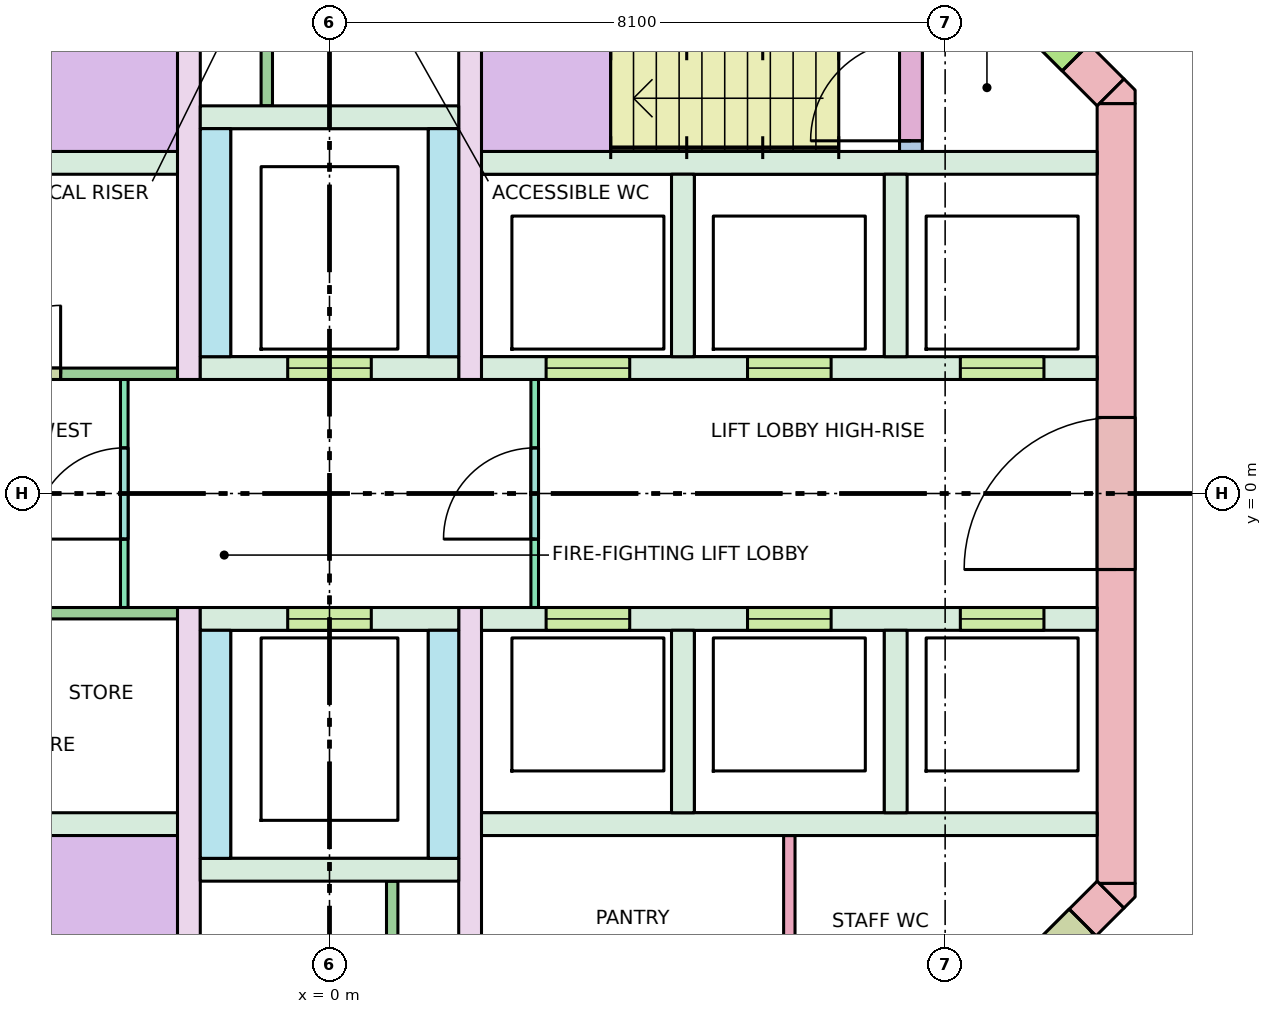
"""IFC4 building model, lengths in metres.
Left out: names, types, materials, properties, quantities, classifications, styles, units other than length and angle.
Written with IfcOpenShell. Run it as: python <this file> out.ifc"""

import sys

from ifc_helpers import new_model, si_unit, direction, frame, frame_2d, origin, place, context, subcontext, project, spatial, polyline, rectangle, outline, extrude, element, fill, save


model = new_model("IFC4")
c1 = context("Model", 3, precision=1e-05, world=origin(), true_north=direction((0.0, 1.0)))
c2 = subcontext(c1, "Body", "Model", "MODEL_VIEW")
j1 = project(units=[si_unit("LENGTHUNIT", "METRE"), si_unit("PLANEANGLEUNIT", "RADIAN")], contexts=[c1])
p1 = place(None, origin())
s1 = spatial("IfcSite", under=j1, at=p1, CompositionType="ELEMENT")
p2 = place(p1, origin())
s2 = spatial("IfcBuilding", under=s1, at=p2, CompositionType="ELEMENT")
p3 = place(p2, frame((0.0, 0.0, 283.4)))
s3 = spatial("IfcBuildingStorey", under=s2, at=p3, CompositionType="ELEMENT", Elevation=283.4)
p4 = place(p3, frame((10.35, -5.13, -0.28), z_axis=(0.0, 0.0, 1.0), x_axis=(0.0, 1.0, 0.0)))
e1 = element("IfcWall", 1, at=p4, inside=s3, PredefinedType="SHEAR", context=c2, shape_type="SweptSolid", body=[
    extrude(rectangle(XDim=10.26, YDim=0.5, at=frame_2d((5.13, 0.0))), origin(), (0.0, 0.0, 1.0), 3.7),
])
p5 = place(p4, frame((4.13, 0.0, 0.28)))
e2 = element("IfcOpeningElement", 2, at=p5, cuts=e1, PredefinedType="OPENING", context=c2, shape_type="SweptSolid", body=[
    extrude(rectangle(XDim=2.0, YDim=2.1, at=frame_2d((1.0, 1.05))), frame((0.0, 0.26, 0.0), z_axis=(0.0, -1.0, 0.0), x_axis=(1.0, 0.0, 0.0)), (0.0, 0.0, 1.0), 0.52),
])
p6 = place(p3, frame((7.277, 8.277, -0.28), z_axis=(0.0, 0.0, 1.0), x_axis=(0.707106781187, -0.707106781187, 0.0)))
e3 = element("IfcWall", 3, at=p6, inside=s3, PredefinedType="SHEAR", context=c2, shape_type="SweptSolid", body=[
    extrude(rectangle(XDim=4.243, YDim=0.5, at=frame_2d((2.121, 0.0))), origin(), (0.0, 0.0, 1.0), 3.7),
])
p7 = place(p6, frame((2.393, 0.0, 0.28)))
e4 = element("IfcOpeningElement", 4, at=p7, cuts=e3, PredefinedType="OPENING", context=c2, shape_type="SweptSolid", body=[
    extrude(rectangle(XDim=1.2, YDim=2.1, at=frame_2d((0.6, 1.05))), frame((0.0, 0.26, 0.0), z_axis=(0.0, -1.0, 0.0), x_axis=(1.0, 0.0, 0.0)), (0.0, 0.0, 1.0), 0.52),
])
p8 = place(p3, frame((10.277, -5.277, -0.28), z_axis=(0.0, 0.0, 1.0), x_axis=(-0.707106781187, -0.707106781187, 0.0)))
e5 = element("IfcWall", 5, at=p8, inside=s3, PredefinedType="SHEAR", context=c2, shape_type="SweptSolid", body=[
    extrude(rectangle(XDim=4.243, YDim=0.5, at=frame_2d((2.121, 0.0))), origin(), (0.0, 0.0, 1.0), 3.7),
])
p9 = place(p8, frame((0.52, 0.0, 0.28)))
e6 = element("IfcOpeningElement", 6, at=p9, cuts=e5, PredefinedType="OPENING", context=c2, shape_type="SweptSolid", body=[
    extrude(rectangle(XDim=0.9, YDim=2.1, at=frame_2d((0.45, 1.05))), frame((0.0, 0.26, 0.0), z_axis=(0.0, -1.0, 0.0), x_axis=(1.0, 0.0, 0.0)), (0.0, 0.0, 1.0), 0.52),
])
p10 = place(p3, frame((0.0, 0.0, -0.28)))
e7 = element("IfcWall", 7, at=p10, inside=s3, PredefinedType="SHEAR", context=c2, shape_type="SweptSolid", body=[
    extrude(outline(polyline([(10.6, -5.307), (10.454, -5.454), (10.13, -5.13), (10.6, -5.13), (10.6, -5.307)])), origin(), (0.0, 0.0, 1.0), 3.7),
])
p11 = place(p3, frame((0.0, 0.0, -0.28)))
e8 = element("IfcWall", 8, at=p11, inside=s3, PredefinedType="SHEAR", context=c2, shape_type="SweptSolid", body=[
    extrude(outline(polyline([(10.6, 5.307), (10.6, 5.13), (10.13, 5.13), (10.454, 5.454), (10.6, 5.307)])), origin(), (0.0, 0.0, 1.0), 3.7),
])
for number, where, z_axis, x_axis in (
    (9, (-10.1, 4.35, 0.0), (0.0, 0.0, 1.0), (1.0, 0.0, 0.0)),
    (10, (-10.1, -4.35, 0.0), (0.0, 0.0, 1.0), (1.0, 0.0, 0.0)),
    (11, (2.0, 4.35, 0.0), (0.0, 0.0, 1.0), (1.0, 0.0, 0.0)),
    (12, (2.0, -4.35, 0.0), (0.0, 0.0, 1.0), (1.0, 0.0, 0.0)),
):
    element("IfcWall", number, at=place(p3, frame(where, z_axis=z_axis, x_axis=x_axis)), inside=s3, PredefinedType="SOLIDWALL", context=c2, shape_type="SweptSolid", body=[
        extrude(rectangle(XDim=8.1, YDim=0.3, at=frame_2d((4.05, 0.0))), origin(), (0.0, 0.0, 1.0), 3.42),
    ])
p12 = place(p3, frame((2.0, 1.65, 0.0), z_axis=(0.0, 0.0, 1.0), x_axis=(1.0, 0.0, 0.0)))
e13 = element("IfcWall", 13, at=p12, inside=s3, PredefinedType="SOLIDWALL", context=c2, shape_type="SweptSolid", body=[
    extrude(rectangle(XDim=8.1, YDim=0.3, at=frame_2d((4.05, 0.0))), origin(), (0.0, 0.0, 1.0), 3.42),
])
p13 = place(p12, frame((0.85, 0.0, 0.0)))
e14 = element("IfcOpeningElement", 14, at=p13, cuts=e13, PredefinedType="OPENING", context=c2, shape_type="SweptSolid", body=[
    extrude(rectangle(XDim=1.1, YDim=2.1, at=frame_2d((0.55, 1.05))), frame((0.0, 0.16, 0.0), z_axis=(0.0, -1.0, 0.0), x_axis=(1.0, 0.0, 0.0)), (0.0, 0.0, 1.0), 0.32),
])
p14 = place(p12, frame((3.5, 0.0, 0.0)))
e15 = element("IfcOpeningElement", 15, at=p14, cuts=e13, PredefinedType="OPENING", context=c2, shape_type="SweptSolid", body=[
    extrude(rectangle(XDim=1.1, YDim=2.1, at=frame_2d((0.55, 1.05))), frame((0.0, 0.16, 0.0), z_axis=(0.0, -1.0, 0.0), x_axis=(1.0, 0.0, 0.0)), (0.0, 0.0, 1.0), 0.32),
])
p15 = place(p12, frame((6.3, 0.0, 0.0)))
e16 = element("IfcOpeningElement", 16, at=p15, cuts=e13, PredefinedType="OPENING", context=c2, shape_type="SweptSolid", body=[
    extrude(rectangle(XDim=1.1, YDim=2.1, at=frame_2d((0.55, 1.05))), frame((0.0, 0.16, 0.0), z_axis=(0.0, -1.0, 0.0), x_axis=(1.0, 0.0, 0.0)), (0.0, 0.0, 1.0), 0.32),
])
p16 = place(p3, frame((2.0, -1.65, 0.0), z_axis=(0.0, 0.0, 1.0), x_axis=(1.0, 0.0, 0.0)))
e17 = element("IfcWall", 17, at=p16, inside=s3, PredefinedType="SOLIDWALL", context=c2, shape_type="SweptSolid", body=[
    extrude(rectangle(XDim=8.1, YDim=0.3, at=frame_2d((4.05, 0.0))), origin(), (0.0, 0.0, 1.0), 3.42),
])
p17 = place(p16, frame((0.85, 0.0, 0.0)))
e18 = element("IfcOpeningElement", 18, at=p17, cuts=e17, PredefinedType="OPENING", context=c2, shape_type="SweptSolid", body=[
    extrude(rectangle(XDim=1.1, YDim=2.1, at=frame_2d((0.55, 1.05))), frame((0.0, 0.16, 0.0), z_axis=(0.0, -1.0, 0.0), x_axis=(1.0, 0.0, 0.0)), (0.0, 0.0, 1.0), 0.32),
])
p18 = place(p16, frame((3.5, 0.0, 0.0)))
e19 = element("IfcOpeningElement", 19, at=p18, cuts=e17, PredefinedType="OPENING", context=c2, shape_type="SweptSolid", body=[
    extrude(rectangle(XDim=1.1, YDim=2.1, at=frame_2d((0.55, 1.05))), frame((0.0, 0.16, 0.0), z_axis=(0.0, -1.0, 0.0), x_axis=(1.0, 0.0, 0.0)), (0.0, 0.0, 1.0), 0.32),
])
p19 = place(p16, frame((6.3, 0.0, 0.0)))
e20 = element("IfcOpeningElement", 20, at=p19, cuts=e17, PredefinedType="OPENING", context=c2, shape_type="SweptSolid", body=[
    extrude(rectangle(XDim=1.1, YDim=2.1, at=frame_2d((0.55, 1.05))), frame((0.0, 0.16, 0.0), z_axis=(0.0, -1.0, 0.0), x_axis=(1.0, 0.0, 0.0)), (0.0, 0.0, 1.0), 0.32),
])
for number, where, z_axis, x_axis in (
    (21, (4.65, 1.8, 0.0), (0.0, 0.0, 1.0), (0.0, 1.0, 0.0)),
    (22, (4.65, -4.2, 0.0), (0.0, 0.0, 1.0), (0.0, 1.0, 0.0)),
    (23, (7.45, 1.8, 0.0), (0.0, 0.0, 1.0), (0.0, 1.0, 0.0)),
    (24, (7.45, -4.2, 0.0), (0.0, 0.0, 1.0), (0.0, 1.0, 0.0)),
):
    element("IfcWall", number, at=place(p3, frame(where, z_axis=z_axis, x_axis=x_axis)), inside=s3, PredefinedType="SOLIDWALL", context=c2, shape_type="SweptSolid", body=[
        extrude(rectangle(XDim=2.4, YDim=0.3, at=frame_2d((1.2, 0.0))), origin(), (0.0, 0.0, 1.0), 3.42),
    ])
for number, where, z_axis, x_axis in (
    (25, (-1.85, 1.5, 0.0), (0.0, 0.0, 1.0), (0.0, 1.0, 0.0)),
    (26, (-1.85, -8.1, 0.0), (0.0, 0.0, 1.0), (0.0, 1.0, 0.0)),
    (27, (1.85, 1.5, 0.0), (0.0, 0.0, 1.0), (0.0, 1.0, 0.0)),
    (28, (1.85, -8.1, 0.0), (0.0, 0.0, 1.0), (0.0, 1.0, 0.0)),
):
    element("IfcWall", number, at=place(p3, frame(where, z_axis=z_axis, x_axis=x_axis)), inside=s3, PredefinedType="SHEAR", context=c2, shape_type="SweptSolid", body=[
        extrude(rectangle(XDim=6.6, YDim=0.3, at=frame_2d((3.3, 0.0))), origin(), (0.0, 0.0, 1.0), 3.42),
    ])
p20 = place(p3, frame((-1.7, 1.65, 0.0), z_axis=(0.0, 0.0, 1.0), x_axis=(1.0, 0.0, 0.0)))
e29 = element("IfcWall", 29, at=p20, inside=s3, PredefinedType="SOLIDWALL", context=c2, shape_type="SweptSolid", body=[
    extrude(rectangle(XDim=3.4, YDim=0.3, at=frame_2d((1.7, 0.0))), origin(), (0.0, 0.0, 1.0), 3.42),
])
p21 = place(p20, frame((1.15, 0.0, 0.0)))
e30 = element("IfcOpeningElement", 30, at=p21, cuts=e29, PredefinedType="OPENING", context=c2, shape_type="SweptSolid", body=[
    extrude(rectangle(XDim=1.1, YDim=2.1, at=frame_2d((0.55, 1.05))), frame((0.0, 0.16, 0.0), z_axis=(0.0, -1.0, 0.0), x_axis=(1.0, 0.0, 0.0)), (0.0, 0.0, 1.0), 0.32),
])
p22 = place(p3, frame((-1.7, -1.65, 0.0), z_axis=(0.0, 0.0, 1.0), x_axis=(1.0, 0.0, 0.0)))
e31 = element("IfcWall", 31, at=p22, inside=s3, PredefinedType="SOLIDWALL", context=c2, shape_type="SweptSolid", body=[
    extrude(rectangle(XDim=3.4, YDim=0.3, at=frame_2d((1.7, 0.0))), origin(), (0.0, 0.0, 1.0), 3.42),
])
p23 = place(p22, frame((1.15, 0.0, 0.0)))
e32 = element("IfcOpeningElement", 32, at=p23, cuts=e31, PredefinedType="OPENING", context=c2, shape_type="SweptSolid", body=[
    extrude(rectangle(XDim=1.1, YDim=2.1, at=frame_2d((0.55, 1.05))), frame((0.0, 0.16, 0.0), z_axis=(0.0, -1.0, 0.0), x_axis=(1.0, 0.0, 0.0)), (0.0, 0.0, 1.0), 0.32),
])
for number, where, z_axis, x_axis in (
    (33, (-1.5, 1.8, 0.0), (0.0, 0.0, 1.0), (0.0, 1.0, 0.0)),
    (34, (-1.5, -4.8, 0.0), (0.0, 0.0, 1.0), (0.0, 1.0, 0.0)),
    (35, (1.5, 1.8, 0.0), (0.0, 0.0, 1.0), (0.0, 1.0, 0.0)),
    (36, (1.5, -4.8, 0.0), (0.0, 0.0, 1.0), (0.0, 1.0, 0.0)),
):
    element("IfcWall", number, at=place(p3, frame(where, z_axis=z_axis, x_axis=x_axis)), inside=s3, PredefinedType="SOLIDWALL", context=c2, shape_type="SweptSolid", body=[
        extrude(rectangle(XDim=3.0, YDim=0.4, at=frame_2d((1.5, 0.0))), origin(), (0.0, 0.0, 1.0), 3.42),
    ])
for number, where, z_axis, x_axis in (
    (37, (-1.7, 4.95, 0.0), (0.0, 0.0, 1.0), (1.0, 0.0, 0.0)),
    (38, (-1.7, -4.95, 0.0), (0.0, 0.0, 1.0), (1.0, 0.0, 0.0)),
):
    element("IfcWall", number, at=place(p3, frame(where, z_axis=z_axis, x_axis=x_axis)), inside=s3, PredefinedType="SOLIDWALL", context=c2, shape_type="SweptSolid", body=[
        extrude(rectangle(XDim=3.4, YDim=0.3, at=frame_2d((1.7, 0.0))), origin(), (0.0, 0.0, 1.0), 3.42),
    ])
p24 = place(p3, frame((7.65, 4.5, 0.0), z_axis=(0.0, 0.0, 1.0), x_axis=(0.0, 1.0, 0.0)))
e39 = element("IfcWall", 39, at=p24, inside=s3, PredefinedType="SHEAR", context=c2, shape_type="SweptSolid", body=[
    extrude(rectangle(XDim=3.14, YDim=0.3, at=frame_2d((1.57, 0.0))), origin(), (0.0, 0.0, 1.0), 3.42),
])
p25 = place(p24, frame((0.14, 0.0, 0.0)))
e40 = element("IfcOpeningElement", 40, at=p25, cuts=e39, PredefinedType="OPENING", context=c2, shape_type="SweptSolid", body=[
    extrude(rectangle(XDim=1.32, YDim=2.1, at=frame_2d((0.66, 1.05))), frame((0.0, 0.16, 0.0), z_axis=(0.0, -1.0, 0.0), x_axis=(1.0, 0.0, 0.0)), (0.0, 0.0, 1.0), 0.32),
])
p26 = place(p3, frame((-2.7, -1.5, 0.0), z_axis=(0.0, 0.0, 1.0), x_axis=(0.0, 1.0, 0.0)))
e41 = element("IfcWall", 41, at=p26, inside=s3, PredefinedType="PARTITIONING", context=c2, shape_type="SweptSolid", body=[
    extrude(rectangle(XDim=3.0, YDim=0.1, at=frame_2d((1.5, 0.0))), origin(), (0.0, 0.0, 1.0), 3.42),
])
p27 = place(p26, frame((0.9, 0.0, 0.0)))
e42 = element("IfcOpeningElement", 42, at=p27, cuts=e41, PredefinedType="OPENING", context=c2, shape_type="SweptSolid", body=[
    extrude(rectangle(XDim=1.2, YDim=2.1, at=frame_2d((0.6, 1.05))), frame((0.0, 0.06, 0.0), z_axis=(0.0, -1.0, 0.0), x_axis=(1.0, 0.0, 0.0)), (0.0, 0.0, 1.0), 0.12),
])
p28 = place(p3, frame((2.7, -1.5, 0.0), z_axis=(0.0, 0.0, 1.0), x_axis=(0.0, 1.0, 0.0)))
e43 = element("IfcWall", 43, at=p28, inside=s3, PredefinedType="PARTITIONING", context=c2, shape_type="SweptSolid", body=[
    extrude(rectangle(XDim=3.0, YDim=0.1, at=frame_2d((1.5, 0.0))), origin(), (0.0, 0.0, 1.0), 3.42),
])
p29 = place(p28, frame((0.9, 0.0, 0.0)))
e44 = element("IfcOpeningElement", 44, at=p29, cuts=e43, PredefinedType="OPENING", context=c2, shape_type="SweptSolid", body=[
    extrude(rectangle(XDim=1.2, YDim=2.1, at=frame_2d((0.6, 1.05))), frame((0.0, 0.06, 0.0), z_axis=(0.0, -1.0, 0.0), x_axis=(1.0, 0.0, 0.0)), (0.0, 0.0, 1.0), 0.12),
])
for number, where, z_axis, x_axis in (
    (45, (-0.825, 5.1, 0.0), (0.0, 0.0, 1.0), (0.0, 1.0, 0.0)),
    (46, (0.825, -8.1, 0.0), (0.0, 0.0, 1.0), (0.0, 1.0, 0.0)),
):
    element("IfcWall", number, at=place(p3, frame(where, z_axis=z_axis, x_axis=x_axis)), inside=s3, PredefinedType="PARTITIONING", context=c2, shape_type="SweptSolid", body=[
        extrude(rectangle(XDim=3.0, YDim=0.15, at=frame_2d((1.5, 0.0))), origin(), (0.0, 0.0, 1.0), 3.42),
    ])
p30 = place(p3, frame((6.05, -8.1, 0.0), z_axis=(0.0, 0.0, 1.0), x_axis=(0.0, 1.0, 0.0)))
e47 = element("IfcWall", 47, at=p30, inside=s3, PredefinedType="PARTITIONING", context=c2, shape_type="SweptSolid", body=[
    extrude(rectangle(XDim=3.6, YDim=0.15, at=frame_2d((1.8, 0.0))), origin(), (0.0, 0.0, 1.0), 3.42),
])
p31 = place(p3, frame((-10.1, 1.575, 0.0), z_axis=(0.0, 0.0, 1.0), x_axis=(1.0, 0.0, 0.0)))
e48 = element("IfcWall", 48, at=p31, inside=s3, PredefinedType="PARTITIONING", context=c2, shape_type="SweptSolid", body=[
    extrude(rectangle(XDim=8.1, YDim=0.15, at=frame_2d((4.05, 0.0))), origin(), (0.0, 0.0, 1.0), 3.42),
])
p32 = place(p31, frame((1.538, 0.0, 0.0)))
e49 = element("IfcOpeningElement", 49, at=p32, cuts=e48, PredefinedType="OPENING", context=c2, shape_type="SweptSolid", body=[
    extrude(rectangle(XDim=0.9, YDim=2.1, at=frame_2d((0.45, 1.05))), frame((0.0, 0.085, 0.0), z_axis=(0.0, -1.0, 0.0), x_axis=(1.0, 0.0, 0.0)), (0.0, 0.0, 1.0), 0.17),
])
p33 = place(p31, frame((5.663, 0.0, 0.0)))
e50 = element("IfcOpeningElement", 50, at=p33, cuts=e48, PredefinedType="OPENING", context=c2, shape_type="SweptSolid", body=[
    extrude(rectangle(XDim=0.9, YDim=2.1, at=frame_2d((0.45, 1.05))), frame((0.0, 0.085, 0.0), z_axis=(0.0, -1.0, 0.0), x_axis=(1.0, 0.0, 0.0)), (0.0, 0.0, 1.0), 0.17),
])
p34 = place(p3, frame((-10.1, -1.575, 0.0), z_axis=(0.0, 0.0, 1.0), x_axis=(1.0, 0.0, 0.0)))
e51 = element("IfcWall", 51, at=p34, inside=s3, PredefinedType="PARTITIONING", context=c2, shape_type="SweptSolid", body=[
    extrude(rectangle(XDim=8.1, YDim=0.15, at=frame_2d((4.05, 0.0))), origin(), (0.0, 0.0, 1.0), 3.42),
])
p35 = place(p34, frame((0.33, 0.0, 0.0)))
e52 = element("IfcOpeningElement", 52, at=p35, cuts=e51, PredefinedType="OPENING", context=c2, shape_type="SweptSolid", body=[
    extrude(rectangle(XDim=0.9, YDim=2.1, at=frame_2d((0.45, 1.05))), frame((0.0, 0.085, 0.0), z_axis=(0.0, -1.0, 0.0), x_axis=(1.0, 0.0, 0.0)), (0.0, 0.0, 1.0), 0.17),
])
p36 = place(p34, frame((2.04, 0.0, 0.0)))
e53 = element("IfcOpeningElement", 53, at=p36, cuts=e51, PredefinedType="OPENING", context=c2, shape_type="SweptSolid", body=[
    extrude(rectangle(XDim=0.9, YDim=2.1, at=frame_2d((0.45, 1.05))), frame((0.0, 0.085, 0.0), z_axis=(0.0, -1.0, 0.0), x_axis=(1.0, 0.0, 0.0)), (0.0, 0.0, 1.0), 0.17),
])
p37 = place(p34, frame((5.31, 0.0, 0.0)))
e54 = element("IfcOpeningElement", 54, at=p37, cuts=e51, PredefinedType="OPENING", context=c2, shape_type="SweptSolid", body=[
    extrude(rectangle(XDim=0.9, YDim=2.1, at=frame_2d((0.45, 1.05))), frame((0.0, 0.085, 0.0), z_axis=(0.0, -1.0, 0.0), x_axis=(1.0, 0.0, 0.0)), (0.0, 0.0, 1.0), 0.17),
])
p38 = place(p13, origin())
e55 = element("IfcDoor", 55, at=p38, inside=s3, OperationType="DOUBLE_DOOR_SLIDING", PredefinedType="DOOR", context=c2, shape_type="SweptSolid", body=[
    extrude(rectangle(XDim=1.1, YDim=2.1, at=frame_2d((0.55, 1.05))), frame((0.0, 0.025, 0.0), z_axis=(0.0, -1.0, 0.0), x_axis=(1.0, 0.0, 0.0)), (0.0, 0.0, 1.0), 0.05),
])
fill(e14, e55)
p39 = place(p14, origin())
e56 = element("IfcDoor", 56, at=p39, inside=s3, OperationType="DOUBLE_DOOR_SLIDING", PredefinedType="DOOR", context=c2, shape_type="SweptSolid", body=[
    extrude(rectangle(XDim=1.1, YDim=2.1, at=frame_2d((0.55, 1.05))), frame((0.0, 0.025, 0.0), z_axis=(0.0, -1.0, 0.0), x_axis=(1.0, 0.0, 0.0)), (0.0, 0.0, 1.0), 0.05),
])
fill(e15, e56)
p40 = place(p15, origin())
e57 = element("IfcDoor", 57, at=p40, inside=s3, OperationType="DOUBLE_DOOR_SLIDING", PredefinedType="DOOR", context=c2, shape_type="SweptSolid", body=[
    extrude(rectangle(XDim=1.1, YDim=2.1, at=frame_2d((0.55, 1.05))), frame((0.0, 0.025, 0.0), z_axis=(0.0, -1.0, 0.0), x_axis=(1.0, 0.0, 0.0)), (0.0, 0.0, 1.0), 0.05),
])
fill(e16, e57)
p41 = place(p17, origin())
e58 = element("IfcDoor", 58, at=p41, inside=s3, OperationType="DOUBLE_DOOR_SLIDING", PredefinedType="DOOR", context=c2, shape_type="SweptSolid", body=[
    extrude(rectangle(XDim=1.1, YDim=2.1, at=frame_2d((0.55, 1.05))), frame((0.0, 0.025, 0.0), z_axis=(0.0, -1.0, 0.0), x_axis=(1.0, 0.0, 0.0)), (0.0, 0.0, 1.0), 0.05),
])
fill(e18, e58)
p42 = place(p18, origin())
e59 = element("IfcDoor", 59, at=p42, inside=s3, OperationType="DOUBLE_DOOR_SLIDING", PredefinedType="DOOR", context=c2, shape_type="SweptSolid", body=[
    extrude(rectangle(XDim=1.1, YDim=2.1, at=frame_2d((0.55, 1.05))), frame((0.0, 0.025, 0.0), z_axis=(0.0, -1.0, 0.0), x_axis=(1.0, 0.0, 0.0)), (0.0, 0.0, 1.0), 0.05),
])
fill(e19, e59)
p43 = place(p19, origin())
e60 = element("IfcDoor", 60, at=p43, inside=s3, OperationType="DOUBLE_DOOR_SLIDING", PredefinedType="DOOR", context=c2, shape_type="SweptSolid", body=[
    extrude(rectangle(XDim=1.1, YDim=2.1, at=frame_2d((0.55, 1.05))), frame((0.0, 0.025, 0.0), z_axis=(0.0, -1.0, 0.0), x_axis=(1.0, 0.0, 0.0)), (0.0, 0.0, 1.0), 0.05),
])
fill(e20, e60)
p44 = place(p21, origin())
e61 = element("IfcDoor", 61, at=p44, inside=s3, OperationType="DOUBLE_DOOR_SLIDING", PredefinedType="DOOR", context=c2, shape_type="SweptSolid", body=[
    extrude(rectangle(XDim=1.1, YDim=2.1, at=frame_2d((0.55, 1.05))), frame((0.0, 0.025, 0.0), z_axis=(0.0, -1.0, 0.0), x_axis=(1.0, 0.0, 0.0)), (0.0, 0.0, 1.0), 0.05),
])
fill(e30, e61)
p45 = place(p23, origin())
e62 = element("IfcDoor", 62, at=p45, inside=s3, OperationType="DOUBLE_DOOR_SLIDING", PredefinedType="DOOR", context=c2, shape_type="SweptSolid", body=[
    extrude(rectangle(XDim=1.1, YDim=2.1, at=frame_2d((0.55, 1.05))), frame((0.0, 0.025, 0.0), z_axis=(0.0, -1.0, 0.0), x_axis=(1.0, 0.0, 0.0)), (0.0, 0.0, 1.0), 0.05),
])
fill(e32, e62)
p46 = place(p25, origin())
e63 = element("IfcDoor", 63, at=p46, inside=s3, OperationType="DOUBLE_DOOR_SINGLE_SWING", PredefinedType="DOOR", context=c2, shape_type="SweptSolid", body=[
    extrude(rectangle(XDim=1.32, YDim=2.1, at=frame_2d((0.66, 1.05))), frame((0.0, 0.025, 0.0), z_axis=(0.0, -1.0, 0.0), x_axis=(1.0, 0.0, 0.0)), (0.0, 0.0, 1.0), 0.05),
])
fill(e40, e63)
p47 = place(p7, origin())
e64 = element("IfcDoor", 64, at=p47, inside=s3, OperationType="SINGLE_SWING_RIGHT", PredefinedType="DOOR", context=c2, shape_type="SweptSolid", body=[
    extrude(rectangle(XDim=1.2, YDim=2.1, at=frame_2d((0.6, 1.05))), frame((0.0, 0.025, 0.0), z_axis=(0.0, -1.0, 0.0), x_axis=(1.0, 0.0, 0.0)), (0.0, 0.0, 1.0), 0.05),
])
fill(e4, e64)
p48 = place(p5, origin())
e65 = element("IfcDoor", 65, at=p48, inside=s3, OperationType="DOUBLE_DOOR_SINGLE_SWING", PredefinedType="DOOR", context=c2, shape_type="SweptSolid", body=[
    extrude(rectangle(XDim=2.0, YDim=2.1, at=frame_2d((1.0, 1.05))), frame((0.0, 0.025, 0.0), z_axis=(0.0, -1.0, 0.0), x_axis=(1.0, 0.0, 0.0)), (0.0, 0.0, 1.0), 0.05),
])
fill(e2, e65)
p49 = place(p27, origin())
e66 = element("IfcDoor", 66, at=p49, inside=s3, OperationType="SINGLE_SWING_LEFT", PredefinedType="DOOR", context=c2, shape_type="SweptSolid", body=[
    extrude(rectangle(XDim=1.2, YDim=2.1, at=frame_2d((0.6, 1.05))), frame((0.0, 0.025, 0.0), z_axis=(0.0, -1.0, 0.0), x_axis=(1.0, 0.0, 0.0)), (0.0, 0.0, 1.0), 0.05),
])
fill(e42, e66)
p50 = place(p29, origin())
e67 = element("IfcDoor", 67, at=p50, inside=s3, OperationType="SINGLE_SWING_LEFT", PredefinedType="DOOR", context=c2, shape_type="SweptSolid", body=[
    extrude(rectangle(XDim=1.2, YDim=2.1, at=frame_2d((0.6, 1.05))), frame((0.0, 0.025, 0.0), z_axis=(0.0, -1.0, 0.0), x_axis=(1.0, 0.0, 0.0)), (0.0, 0.0, 1.0), 0.05),
])
fill(e44, e67)
p51 = place(p9, origin())
e68 = element("IfcDoor", 68, at=p51, inside=s3, OperationType="SINGLE_SWING_RIGHT", PredefinedType="DOOR", context=c2, shape_type="SweptSolid", body=[
    extrude(rectangle(XDim=0.9, YDim=2.1, at=frame_2d((0.45, 1.05))), frame((0.0, 0.025, 0.0), z_axis=(0.0, -1.0, 0.0), x_axis=(1.0, 0.0, 0.0)), (0.0, 0.0, 1.0), 0.05),
])
fill(e6, e68)
p52 = place(p33, origin())
e69 = element("IfcDoor", 69, at=p52, inside=s3, OperationType="SINGLE_SWING_RIGHT", PredefinedType="DOOR", context=c2, shape_type="SweptSolid", body=[
    extrude(rectangle(XDim=0.9, YDim=2.1, at=frame_2d((0.45, 1.05))), frame((0.0, 0.025, 0.0), z_axis=(0.0, -1.0, 0.0), x_axis=(1.0, 0.0, 0.0)), (0.0, 0.0, 1.0), 0.05),
])
fill(e50, e69)
save(model, sys.argv[1])
